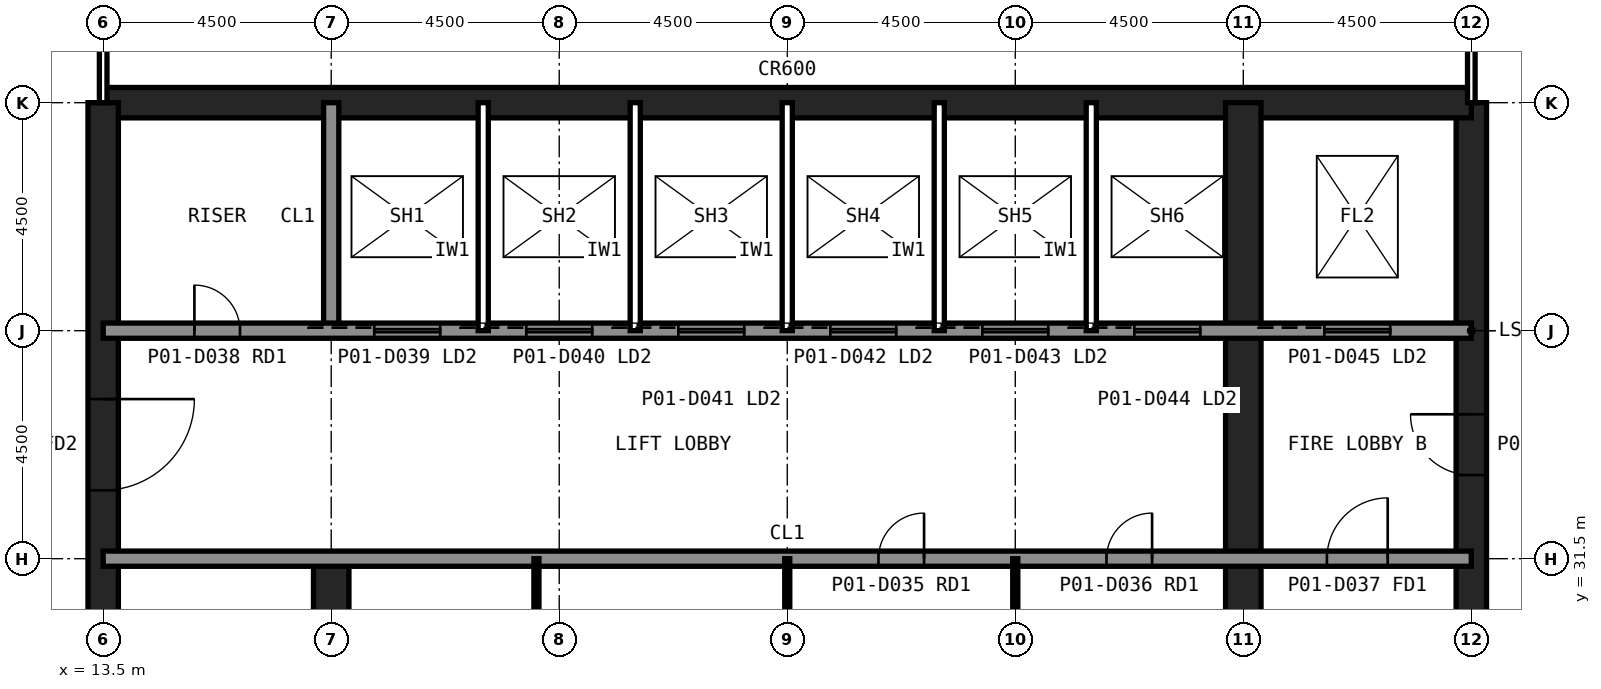
"""IFC4 building model, lengths in metres.
Left out: names, types, materials, properties, quantities, classifications, styles, units other than length and angle.
Written with IfcOpenShell. Run it as: python <this file> out.ifc"""

import sys

from ifc_helpers import new_model, si_unit, direction, frame, frame_2d, origin, place, context, subcontext, project, spatial, rectangle, extrude, element, fill, save


model = new_model("IFC4")
c1 = context("Model", 3, precision=1e-05, world=origin(), true_north=direction((0.0, 1.0)))
c2 = subcontext(c1, "Body", "Model", "MODEL_VIEW")
j1 = project(units=[si_unit("LENGTHUNIT", "METRE"), si_unit("PLANEANGLEUNIT", "RADIAN")], contexts=[c1])
p1 = place(None, origin())
s1 = spatial("IfcSite", under=j1, at=p1, CompositionType="ELEMENT")
p2 = place(p1, origin())
s2 = spatial("IfcBuilding", under=s1, at=p2, CompositionType="ELEMENT")
p3 = place(p2, origin())
s3 = spatial("IfcBuildingStorey", under=s2, at=p3, CompositionType="ELEMENT", Elevation=0.0)
p4 = place(p3, frame((40.5, 13.5, -0.25), z_axis=(0.0, 0.0, 1.0), x_axis=(0.0, 1.0, 0.0)))
e1 = element("IfcWall", 1, at=p4, inside=s3, PredefinedType="SHEAR", context=c2, shape_type="SweptSolid", body=[
    extrude(rectangle(XDim=27.0, YDim=0.6, at=frame_2d((13.5, 0.0))), origin(), (0.0, 0.0, 1.0), 6.25),
])
p5 = place(p4, frame((5.85, 0.0, 0.25)))
e2 = element("IfcOpeningElement", 2, at=p5, cuts=e1, PredefinedType="OPENING", context=c2, shape_type="SweptSolid", body=[
    extrude(rectangle(XDim=1.8, YDim=2.1, at=frame_2d((0.9, 1.05))), frame((0.0, 0.31, 0.0), z_axis=(0.0, -1.0, 0.0), x_axis=(1.0, 0.0, 0.0)), (0.0, 0.0, 1.0), 0.62),
])
p6 = place(p4, frame((19.65, 0.0, 0.25)))
e3 = element("IfcOpeningElement", 3, at=p6, cuts=e1, PredefinedType="OPENING", context=c2, shape_type="SweptSolid", body=[
    extrude(rectangle(XDim=1.2, YDim=2.1, at=frame_2d((0.6, 1.05))), frame((0.0, 0.31, 0.0), z_axis=(0.0, -1.0, 0.0), x_axis=(1.0, 0.0, 0.0)), (0.0, 0.0, 1.0), 0.62),
])
p7 = place(p3, frame((40.5, 40.5, -0.25), z_axis=(0.0, 0.0, 1.0), x_axis=(-1.0, 0.0, 0.0)))
e4 = element("IfcWall", 4, at=p7, inside=s3, PredefinedType="SHEAR", context=c2, shape_type="SweptSolid", body=[
    extrude(rectangle(XDim=27.0, YDim=0.6, at=frame_2d((13.5, 0.0))), origin(), (0.0, 0.0, 1.0), 6.25),
])
p8 = place(p3, frame((13.5, 40.5, -0.25), z_axis=(0.0, 0.0, 1.0), x_axis=(0.0, -1.0, 0.0)))
e5 = element("IfcWall", 5, at=p8, inside=s3, PredefinedType="SHEAR", context=c2, shape_type="SweptSolid", body=[
    extrude(rectangle(XDim=27.0, YDim=0.6, at=frame_2d((13.5, 0.0))), origin(), (0.0, 0.0, 1.0), 6.25),
])
p9 = place(p8, frame((19.65, 0.0, 0.25)))
e6 = element("IfcOpeningElement", 6, at=p9, cuts=e5, PredefinedType="OPENING", context=c2, shape_type="SweptSolid", body=[
    extrude(rectangle(XDim=1.2, YDim=2.1, at=frame_2d((0.6, 1.05))), frame((0.0, 0.31, 0.0), z_axis=(0.0, -1.0, 0.0), x_axis=(1.0, 0.0, 0.0)), (0.0, 0.0, 1.0), 0.62),
])
p10 = place(p8, frame((5.85, 0.0, 0.25)))
e7 = element("IfcOpeningElement", 7, at=p10, cuts=e5, PredefinedType="OPENING", context=c2, shape_type="SweptSolid", body=[
    extrude(rectangle(XDim=1.8, YDim=2.1, at=frame_2d((0.9, 1.05))), frame((0.0, 0.31, 0.0), z_axis=(0.0, -1.0, 0.0), x_axis=(1.0, 0.0, 0.0)), (0.0, 0.0, 1.0), 0.62),
])
p11 = place(p3, frame((18.0, 13.5, -0.25), z_axis=(0.0, 0.0, 1.0), x_axis=(0.0, 1.0, 0.0)))
e8 = element("IfcWall", 8, at=p11, inside=s3, PredefinedType="SHEAR", context=c2, shape_type="SweptSolid", body=[
    extrude(rectangle(XDim=18.0, YDim=0.7, at=frame_2d((9.0, 0.0))), origin(), (0.0, 0.0, 1.0), 6.25),
])
p12 = place(p3, frame((18.0, 36.0, -0.25), z_axis=(0.0, 0.0, 1.0), x_axis=(0.0, 1.0, 0.0)))
e9 = element("IfcWall", 9, at=p12, inside=s3, PredefinedType="SOLIDWALL", context=c2, shape_type="SweptSolid", body=[
    extrude(rectangle(XDim=4.5, YDim=0.3, at=frame_2d((2.25, 0.0))), origin(), (0.0, 0.0, 1.0), 6.05),
])
p13 = place(p3, frame((36.0, 22.5, -0.25), z_axis=(0.0, 0.0, 1.0), x_axis=(0.0, 1.0, 0.0)))
e10 = element("IfcWall", 10, at=p13, inside=s3, PredefinedType="SHEAR", context=c2, shape_type="SweptSolid", body=[
    extrude(rectangle(XDim=18.0, YDim=0.7, at=frame_2d((9.0, 0.0))), origin(), (0.0, 0.0, 1.0), 6.25),
])
p14 = place(p3, frame((13.5, 36.0, -0.25), z_axis=(0.0, 0.0, 1.0), x_axis=(1.0, 0.0, 0.0)))
e11 = element("IfcWall", 11, at=p14, inside=s3, PredefinedType="SOLIDWALL", context=c2, shape_type="SweptSolid", body=[
    extrude(rectangle(XDim=27.0, YDim=0.3, at=frame_2d((13.5, 0.0))), origin(), (0.0, 0.0, 1.0), 6.05),
])
p15 = place(p14, frame((1.8, 0.0, 0.25)))
e12 = element("IfcOpeningElement", 12, at=p15, cuts=e11, PredefinedType="OPENING", context=c2, shape_type="SweptSolid", body=[
    extrude(rectangle(XDim=0.9, YDim=2.1, at=frame_2d((0.45, 1.05))), frame((0.0, 0.16, 0.0), z_axis=(0.0, -1.0, 0.0), x_axis=(1.0, 0.0, 0.0)), (0.0, 0.0, 1.0), 0.32),
])
p16 = place(p14, frame((5.35, 0.0, 0.25)))
e13 = element("IfcOpeningElement", 13, at=p16, cuts=e11, PredefinedType="OPENING", context=c2, shape_type="SweptSolid", body=[
    extrude(rectangle(XDim=1.3, YDim=2.2, at=frame_2d((0.65, 1.1))), frame((0.0, 0.16, 0.0), z_axis=(0.0, -1.0, 0.0), x_axis=(1.0, 0.0, 0.0)), (0.0, 0.0, 1.0), 0.32),
])
p17 = place(p14, frame((14.35, 0.0, 0.25)))
e14 = element("IfcOpeningElement", 14, at=p17, cuts=e11, PredefinedType="OPENING", context=c2, shape_type="SweptSolid", body=[
    extrude(rectangle(XDim=1.3, YDim=2.2, at=frame_2d((0.65, 1.1))), frame((0.0, 0.16, 0.0), z_axis=(0.0, -1.0, 0.0), x_axis=(1.0, 0.0, 0.0)), (0.0, 0.0, 1.0), 0.32),
])
p18 = place(p14, frame((8.35, 0.0, 0.25)))
e15 = element("IfcOpeningElement", 15, at=p18, cuts=e11, PredefinedType="OPENING", context=c2, shape_type="SweptSolid", body=[
    extrude(rectangle(XDim=1.3, YDim=2.2, at=frame_2d((0.65, 1.1))), frame((0.0, 0.16, 0.0), z_axis=(0.0, -1.0, 0.0), x_axis=(1.0, 0.0, 0.0)), (0.0, 0.0, 1.0), 0.32),
])
p19 = place(p14, frame((17.35, 0.0, 0.25)))
e16 = element("IfcOpeningElement", 16, at=p19, cuts=e11, PredefinedType="OPENING", context=c2, shape_type="SweptSolid", body=[
    extrude(rectangle(XDim=1.3, YDim=2.2, at=frame_2d((0.65, 1.1))), frame((0.0, 0.16, 0.0), z_axis=(0.0, -1.0, 0.0), x_axis=(1.0, 0.0, 0.0)), (0.0, 0.0, 1.0), 0.32),
])
p20 = place(p14, frame((11.35, 0.0, 0.25)))
e17 = element("IfcOpeningElement", 17, at=p20, cuts=e11, PredefinedType="OPENING", context=c2, shape_type="SweptSolid", body=[
    extrude(rectangle(XDim=1.3, YDim=2.2, at=frame_2d((0.65, 1.1))), frame((0.0, 0.16, 0.0), z_axis=(0.0, -1.0, 0.0), x_axis=(1.0, 0.0, 0.0)), (0.0, 0.0, 1.0), 0.32),
])
p21 = place(p14, frame((20.35, 0.0, 0.25)))
e18 = element("IfcOpeningElement", 18, at=p21, cuts=e11, PredefinedType="OPENING", context=c2, shape_type="SweptSolid", body=[
    extrude(rectangle(XDim=1.3, YDim=2.2, at=frame_2d((0.65, 1.1))), frame((0.0, 0.16, 0.0), z_axis=(0.0, -1.0, 0.0), x_axis=(1.0, 0.0, 0.0)), (0.0, 0.0, 1.0), 0.32),
])
p22 = place(p14, frame((24.1, 0.0, 0.25)))
e19 = element("IfcOpeningElement", 19, at=p22, cuts=e11, PredefinedType="OPENING", context=c2, shape_type="SweptSolid", body=[
    extrude(rectangle(XDim=1.3, YDim=2.2, at=frame_2d((0.65, 1.1))), frame((0.0, 0.16, 0.0), z_axis=(0.0, -1.0, 0.0), x_axis=(1.0, 0.0, 0.0)), (0.0, 0.0, 1.0), 0.32),
])
p23 = place(p3, frame((13.5, 31.5, -0.25), z_axis=(0.0, 0.0, 1.0), x_axis=(1.0, 0.0, 0.0)))
e20 = element("IfcWall", 20, at=p23, inside=s3, PredefinedType="SOLIDWALL", context=c2, shape_type="SweptSolid", body=[
    extrude(rectangle(XDim=27.0, YDim=0.3, at=frame_2d((13.5, 0.0))), origin(), (0.0, 0.0, 1.0), 6.05),
])
p24 = place(p23, frame((24.15, 0.0, 0.25)))
e21 = element("IfcOpeningElement", 21, at=p24, cuts=e20, PredefinedType="OPENING", context=c2, shape_type="SweptSolid", body=[
    extrude(rectangle(XDim=1.2, YDim=2.1, at=frame_2d((0.6, 1.05))), frame((0.0, 0.16, 0.0), z_axis=(0.0, -1.0, 0.0), x_axis=(1.0, 0.0, 0.0)), (0.0, 0.0, 1.0), 0.32),
])
p25 = place(p23, frame((15.3, 0.0, 0.25)))
e22 = element("IfcOpeningElement", 22, at=p25, cuts=e20, PredefinedType="OPENING", context=c2, shape_type="SweptSolid", body=[
    extrude(rectangle(XDim=0.9, YDim=2.1, at=frame_2d((0.45, 1.05))), frame((0.0, 0.16, 0.0), z_axis=(0.0, -1.0, 0.0), x_axis=(1.0, 0.0, 0.0)), (0.0, 0.0, 1.0), 0.32),
])
p26 = place(p23, frame((19.8, 0.0, 0.25)))
e23 = element("IfcOpeningElement", 23, at=p26, cuts=e20, PredefinedType="OPENING", context=c2, shape_type="SweptSolid", body=[
    extrude(rectangle(XDim=0.9, YDim=2.1, at=frame_2d((0.45, 1.05))), frame((0.0, 0.16, 0.0), z_axis=(0.0, -1.0, 0.0), x_axis=(1.0, 0.0, 0.0)), (0.0, 0.0, 1.0), 0.32),
])
for number, where, z_axis, x_axis in (
    (24, (21.0, 36.0, -0.25), (0.0, 0.0, 1.0), (0.0, 1.0, 0.0)),
    (25, (24.0, 36.0, -0.25), (0.0, 0.0, 1.0), (0.0, 1.0, 0.0)),
    (26, (27.0, 36.0, -0.25), (0.0, 0.0, 1.0), (0.0, 1.0, 0.0)),
    (27, (30.0, 36.0, -0.25), (0.0, 0.0, 1.0), (0.0, 1.0, 0.0)),
    (28, (33.0, 36.0, -0.25), (0.0, 0.0, 1.0), (0.0, 1.0, 0.0)),
):
    element("IfcWall", number, at=place(p3, frame(where, z_axis=z_axis, x_axis=x_axis)), inside=s3, PredefinedType="PARTITIONING", context=c2, shape_type="SweptSolid", body=[
        extrude(rectangle(XDim=4.5, YDim=0.2, at=frame_2d((2.25, 0.0))), origin(), (0.0, 0.0, 1.0), 6.05),
    ])
for number, where, z_axis, x_axis in (
    (29, (22.05, 22.5, -0.25), (0.0, 0.0, 1.0), (0.0, 1.0, 0.0)),
    (30, (27.0, 22.5, -0.25), (0.0, 0.0, 1.0), (0.0, 1.0, 0.0)),
    (31, (31.5, 22.5, -0.25), (0.0, 0.0, 1.0), (0.0, 1.0, 0.0)),
):
    element("IfcWall", number, at=place(p3, frame(where, z_axis=z_axis, x_axis=x_axis)), inside=s3, PredefinedType="PLUMBINGWALL", context=c2, shape_type="SweptSolid", body=[
        extrude(rectangle(XDim=9.0, YDim=0.1, at=frame_2d((4.5, 0.0))), origin(), (0.0, 0.0, 1.0), 6.05),
    ])
p27 = place(p3, frame((40.5, 53.53, 0.0), z_axis=(0.0, 0.0, 1.0), x_axis=(0.0, -1.0, 0.0)))
e32 = element("IfcWall", 32, at=p27, inside=s3, PredefinedType="PARTITIONING", context=c2, shape_type="SweptSolid", body=[
    extrude(rectangle(XDim=13.03, YDim=0.15, at=frame_2d((6.515, 0.0))), origin(), (0.0, 0.0, 1.0), 4.881),
])
p28 = place(p27, frame((6.015, 0.0, 0.0)))
e33 = element("IfcOpeningElement", 33, at=p28, cuts=e32, PredefinedType="OPENING", context=c2, shape_type="SweptSolid", body=[
    extrude(rectangle(XDim=1.0, YDim=2.1, at=frame_2d((0.5, 1.05))), frame((0.0, 0.085, 0.0), z_axis=(0.0, -1.0, 0.0), x_axis=(1.0, 0.0, 0.0)), (0.0, 0.0, 1.0), 0.17),
])
p29 = place(p3, frame((13.5, 40.5, 0.0), z_axis=(0.0, 0.0, 1.0), x_axis=(0.0, 1.0, 0.0)))
e34 = element("IfcWall", 34, at=p29, inside=s3, PredefinedType="PARTITIONING", context=c2, shape_type="SweptSolid", body=[
    extrude(rectangle(XDim=13.03, YDim=0.15, at=frame_2d((6.515, 0.0))), origin(), (0.0, 0.0, 1.0), 4.881),
])
p30 = place(p29, frame((6.015, 0.0, 0.0)))
e35 = element("IfcOpeningElement", 35, at=p30, cuts=e34, PredefinedType="OPENING", context=c2, shape_type="SweptSolid", body=[
    extrude(rectangle(XDim=1.0, YDim=2.1, at=frame_2d((0.5, 1.05))), frame((0.0, 0.085, 0.0), z_axis=(0.0, -1.0, 0.0), x_axis=(1.0, 0.0, 0.0)), (0.0, 0.0, 1.0), 0.17),
])
p31 = place(p10, origin())
e36 = element("IfcDoor", 36, at=p31, inside=s3, OperationType="SINGLE_SWING_LEFT", PredefinedType="DOOR", context=c2, shape_type="SweptSolid", body=[
    extrude(rectangle(XDim=1.8, YDim=2.1, at=frame_2d((0.9, 1.05))), frame((0.0, 0.025, 0.0), z_axis=(0.0, -1.0, 0.0), x_axis=(1.0, 0.0, 0.0)), (0.0, 0.0, 1.0), 0.05),
])
fill(e7, e36)
p32 = place(p6, origin())
e37 = element("IfcDoor", 37, at=p32, inside=s3, OperationType="SINGLE_SWING_RIGHT", PredefinedType="DOOR", context=c2, shape_type="SweptSolid", body=[
    extrude(rectangle(XDim=1.2, YDim=2.1, at=frame_2d((0.6, 1.05))), frame((0.0, 0.025, 0.0), z_axis=(0.0, -1.0, 0.0), x_axis=(1.0, 0.0, 0.0)), (0.0, 0.0, 1.0), 0.05),
])
fill(e3, e37)
p33 = place(p24, origin())
e38 = element("IfcDoor", 38, at=p33, inside=s3, OperationType="SINGLE_SWING_RIGHT", PredefinedType="DOOR", context=c2, shape_type="SweptSolid", body=[
    extrude(rectangle(XDim=1.2, YDim=2.1, at=frame_2d((0.6, 1.05))), frame((0.0, 0.025, 0.0), z_axis=(0.0, -1.0, 0.0), x_axis=(1.0, 0.0, 0.0)), (0.0, 0.0, 1.0), 0.05),
])
fill(e21, e38)
p34 = place(p25, origin())
e39 = element("IfcDoor", 39, at=p34, inside=s3, OperationType="SINGLE_SWING_RIGHT", PredefinedType="DOOR", context=c2, shape_type="SweptSolid", body=[
    extrude(rectangle(XDim=0.9, YDim=2.1, at=frame_2d((0.45, 1.05))), frame((0.0, 0.025, 0.0), z_axis=(0.0, -1.0, 0.0), x_axis=(1.0, 0.0, 0.0)), (0.0, 0.0, 1.0), 0.05),
])
fill(e22, e39)
p35 = place(p26, origin())
e40 = element("IfcDoor", 40, at=p35, inside=s3, OperationType="SINGLE_SWING_RIGHT", PredefinedType="DOOR", context=c2, shape_type="SweptSolid", body=[
    extrude(rectangle(XDim=0.9, YDim=2.1, at=frame_2d((0.45, 1.05))), frame((0.0, 0.025, 0.0), z_axis=(0.0, -1.0, 0.0), x_axis=(1.0, 0.0, 0.0)), (0.0, 0.0, 1.0), 0.05),
])
fill(e23, e40)
p36 = place(p15, origin())
e41 = element("IfcDoor", 41, at=p36, inside=s3, OperationType="SINGLE_SWING_LEFT", PredefinedType="DOOR", context=c2, shape_type="SweptSolid", body=[
    extrude(rectangle(XDim=0.9, YDim=2.1, at=frame_2d((0.45, 1.05))), frame((0.0, 0.025, 0.0), z_axis=(0.0, -1.0, 0.0), x_axis=(1.0, 0.0, 0.0)), (0.0, 0.0, 1.0), 0.05),
])
fill(e12, e41)
p37 = place(p16, origin())
e42 = element("IfcDoor", 42, at=p37, inside=s3, OperationType="SLIDING_TO_LEFT", PredefinedType="DOOR", context=c2, shape_type="SweptSolid", body=[
    extrude(rectangle(XDim=1.3, YDim=2.2, at=frame_2d((0.65, 1.1))), frame((0.0, 0.025, 0.0), z_axis=(0.0, -1.0, 0.0), x_axis=(1.0, 0.0, 0.0)), (0.0, 0.0, 1.0), 0.05),
])
fill(e13, e42)
p38 = place(p17, origin())
e43 = element("IfcDoor", 43, at=p38, inside=s3, OperationType="SLIDING_TO_LEFT", PredefinedType="DOOR", context=c2, shape_type="SweptSolid", body=[
    extrude(rectangle(XDim=1.3, YDim=2.2, at=frame_2d((0.65, 1.1))), frame((0.0, 0.025, 0.0), z_axis=(0.0, -1.0, 0.0), x_axis=(1.0, 0.0, 0.0)), (0.0, 0.0, 1.0), 0.05),
])
fill(e14, e43)
p39 = place(p18, origin())
e44 = element("IfcDoor", 44, at=p39, inside=s3, OperationType="SLIDING_TO_LEFT", PredefinedType="DOOR", context=c2, shape_type="SweptSolid", body=[
    extrude(rectangle(XDim=1.3, YDim=2.2, at=frame_2d((0.65, 1.1))), frame((0.0, 0.025, 0.0), z_axis=(0.0, -1.0, 0.0), x_axis=(1.0, 0.0, 0.0)), (0.0, 0.0, 1.0), 0.05),
])
fill(e15, e44)
p40 = place(p19, origin())
e45 = element("IfcDoor", 45, at=p40, inside=s3, OperationType="SLIDING_TO_LEFT", PredefinedType="DOOR", context=c2, shape_type="SweptSolid", body=[
    extrude(rectangle(XDim=1.3, YDim=2.2, at=frame_2d((0.65, 1.1))), frame((0.0, 0.025, 0.0), z_axis=(0.0, -1.0, 0.0), x_axis=(1.0, 0.0, 0.0)), (0.0, 0.0, 1.0), 0.05),
])
fill(e16, e45)
p41 = place(p20, origin())
e46 = element("IfcDoor", 46, at=p41, inside=s3, OperationType="SLIDING_TO_LEFT", PredefinedType="DOOR", context=c2, shape_type="SweptSolid", body=[
    extrude(rectangle(XDim=1.3, YDim=2.2, at=frame_2d((0.65, 1.1))), frame((0.0, 0.025, 0.0), z_axis=(0.0, -1.0, 0.0), x_axis=(1.0, 0.0, 0.0)), (0.0, 0.0, 1.0), 0.05),
])
fill(e17, e46)
p42 = place(p21, origin())
e47 = element("IfcDoor", 47, at=p42, inside=s3, OperationType="SLIDING_TO_LEFT", PredefinedType="DOOR", context=c2, shape_type="SweptSolid", body=[
    extrude(rectangle(XDim=1.3, YDim=2.2, at=frame_2d((0.65, 1.1))), frame((0.0, 0.025, 0.0), z_axis=(0.0, -1.0, 0.0), x_axis=(1.0, 0.0, 0.0)), (0.0, 0.0, 1.0), 0.05),
])
fill(e18, e47)
p43 = place(p22, origin())
e48 = element("IfcDoor", 48, at=p43, inside=s3, OperationType="SLIDING_TO_LEFT", PredefinedType="DOOR", context=c2, shape_type="SweptSolid", body=[
    extrude(rectangle(XDim=1.3, YDim=2.2, at=frame_2d((0.65, 1.1))), frame((0.0, 0.025, 0.0), z_axis=(0.0, -1.0, 0.0), x_axis=(1.0, 0.0, 0.0)), (0.0, 0.0, 1.0), 0.05),
])
fill(e19, e48)
save(model, sys.argv[1])
